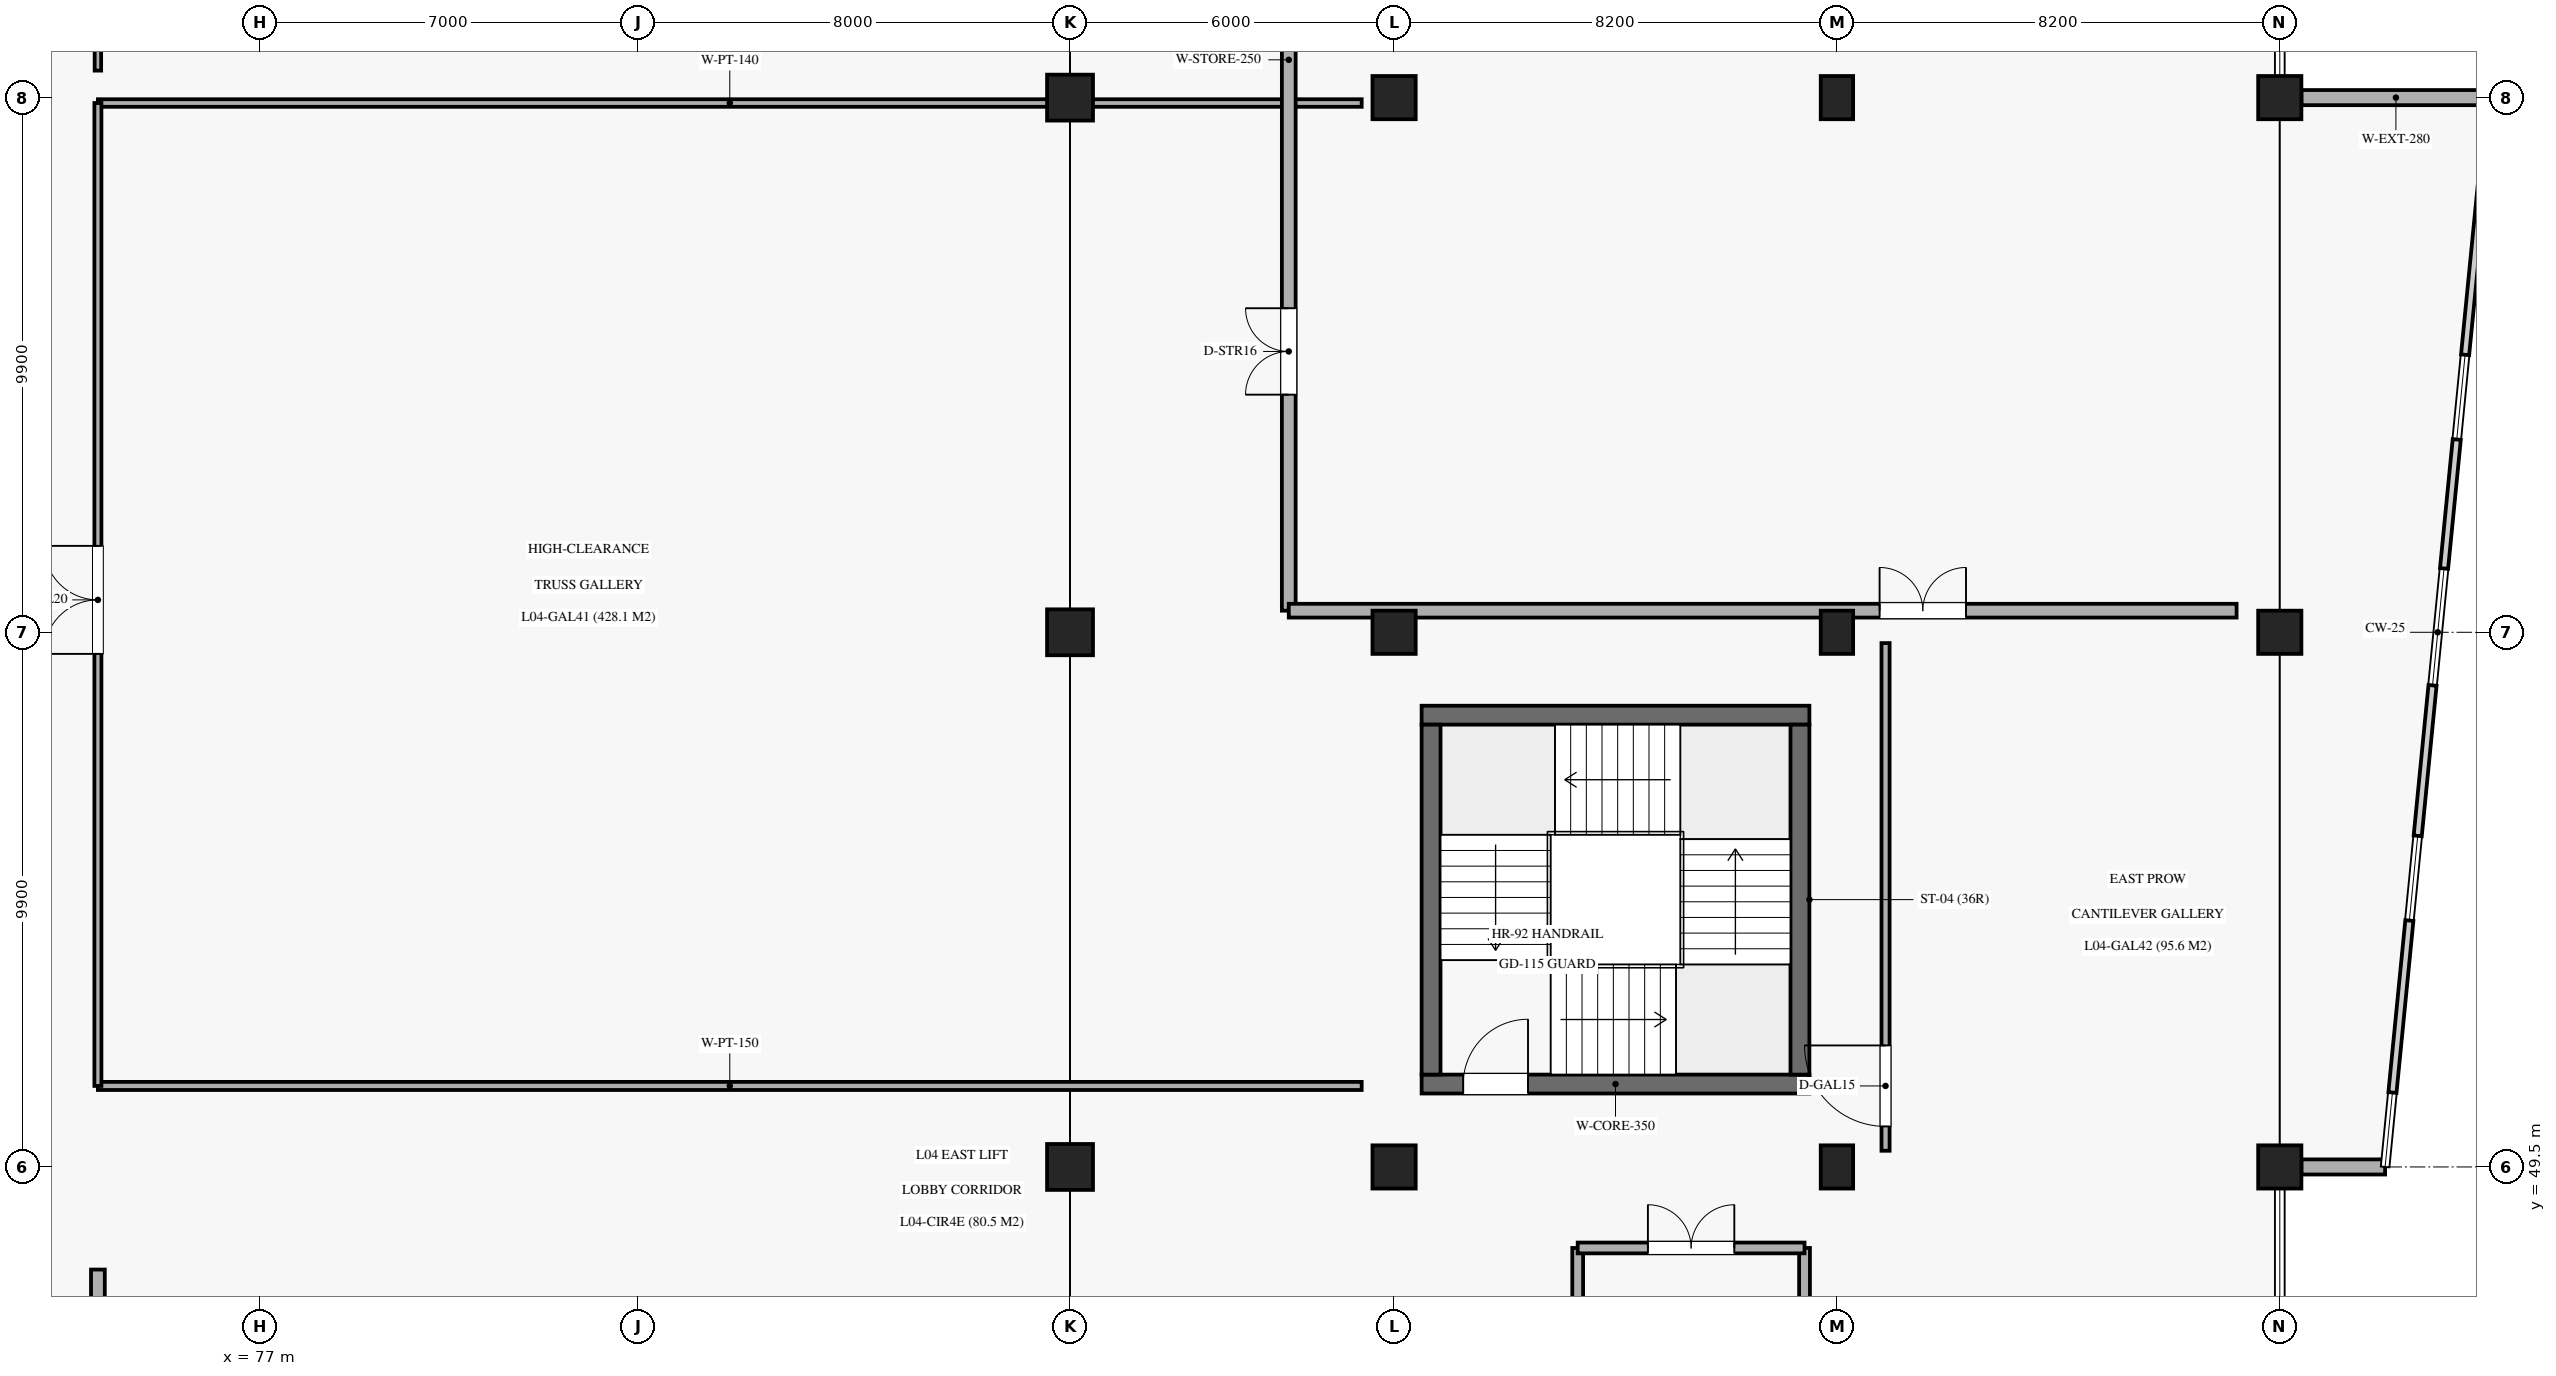
"""IFC4 building model, lengths in metres.
Left out: names, types, materials, properties, quantities, classifications, styles, units other than length and angle.
Written with IfcOpenShell. Run it as: python <this file> out.ifc"""

import sys

from ifc_helpers import new_model, si_unit, direction, frame, frame_2d, origin, origin_2d, place, context, subcontext, project, spatial, rectangle, extrude, element, fill, save


model = new_model("IFC4")
c1 = context("Model", 3, precision=1e-05, world=origin(), true_north=direction((0.0, 1.0)))
c2 = subcontext(c1, "Body", "Model", "MODEL_VIEW")
j1 = project(units=[si_unit("LENGTHUNIT", "METRE"), si_unit("PLANEANGLEUNIT", "RADIAN")], contexts=[c1])
p1 = place(None, origin())
s1 = spatial("IfcSite", under=j1, at=p1, CompositionType="ELEMENT")
p2 = place(p1, origin())
s2 = spatial("IfcBuilding", under=s1, at=p2, CompositionType="ELEMENT")
p3 = place(p2, frame((0.0, 0.0, 22.44)))
s3 = spatial("IfcBuildingStorey", under=s2, at=p3, CompositionType="ELEMENT", Elevation=22.44)
for number, where, z_axis, x_axis in (
    (1, (92.0, 49.5, 0.0), (0.0, 0.0, 1.0), (1.0, 0.0, 0.0)),
    (2, (92.0, 59.4, 0.0), (0.0, 0.0, 1.0), (1.0, 0.0, 0.0)),
    (3, (92.0, 69.3, 0.0), (0.0, 0.0, 1.0), (1.0, 0.0, 0.0)),
):
    element("IfcColumn", number, at=place(p3, frame(where, z_axis=z_axis, x_axis=x_axis)), inside=s3, PredefinedType="COLUMN", context=c2, shape_type="SweptSolid", body=[
        extrude(rectangle(XDim=0.85, YDim=0.85, at=origin_2d()), origin(), (0.0, 0.0, 1.0), 6.12),
    ])
for number, where, z_axis, x_axis in (
    (4, (98.0, 49.5, 0.0), (0.0, 0.0, 1.0), (1.0, 0.0, 0.0)),
    (5, (98.0, 59.4, 0.0), (0.0, 0.0, 1.0), (1.0, 0.0, 0.0)),
    (6, (98.0, 69.3, 0.0), (0.0, 0.0, 1.0), (1.0, 0.0, 0.0)),
):
    element("IfcColumn", number, at=place(p3, frame(where, z_axis=z_axis, x_axis=x_axis)), inside=s3, PredefinedType="COLUMN", context=c2, shape_type="SweptSolid", body=[
        extrude(rectangle(XDim=0.8, YDim=0.8, at=origin_2d()), origin(), (0.0, 0.0, 1.0), 6.12),
    ])
for number, where, z_axis, x_axis in (
    (7, (106.2, 49.5, 0.0), (0.0, 0.0, 1.0), (1.0, 0.0, 0.0)),
    (8, (106.2, 59.4, 0.0), (0.0, 0.0, 1.0), (1.0, 0.0, 0.0)),
    (9, (106.2, 69.3, 0.0), (0.0, 0.0, 1.0), (1.0, 0.0, 0.0)),
):
    element("IfcColumn", number, at=place(p3, frame(where, z_axis=z_axis, x_axis=x_axis)), inside=s3, PredefinedType="COLUMN", context=c2, shape_type="SweptSolid", body=[
        extrude(rectangle(XDim=0.6, YDim=0.8, at=origin_2d()), origin(), (0.0, 0.0, 1.0), 6.12),
    ])
for number, where, z_axis, x_axis in (
    (10, (114.4, 49.5, 0.0), (0.0, 0.0, 1.0), (1.0, 0.0, 0.0)),
    (11, (114.4, 59.4, 0.0), (0.0, 0.0, 1.0), (1.0, 0.0, 0.0)),
    (12, (114.4, 69.3, 0.0), (0.0, 0.0, 1.0), (1.0, 0.0, 0.0)),
):
    element("IfcColumn", number, at=place(p3, frame(where, z_axis=z_axis, x_axis=x_axis)), inside=s3, PredefinedType="COLUMN", context=c2, shape_type="SweptSolid", body=[
        extrude(rectangle(XDim=0.8, YDim=0.8, at=origin_2d()), origin(), (0.0, 0.0, 1.0), 6.12),
    ])
p4 = place(p3, frame((114.8, 49.5, 0.0), z_axis=(0.0, 0.0, 1.0), x_axis=(1.0, 0.0, 0.0)))
e13 = element("IfcWall", 13, at=p4, inside=s3, PredefinedType="SOLIDWALL", context=c2, shape_type="SweptSolid", body=[
    extrude(rectangle(XDim=1.55, YDim=0.28, at=frame_2d((0.775, 0.0))), origin(), (0.0, 0.0, 1.0), 5.06),
])
p5 = place(p3, frame((118.3, 69.3, 0.0), z_axis=(0.0, 0.0, 1.0), x_axis=(-1.0, 0.0, 0.0)))
e14 = element("IfcWall", 14, at=p5, inside=s3, PredefinedType="SOLIDWALL", context=c2, shape_type="SweptSolid", body=[
    extrude(rectangle(XDim=3.5, YDim=0.28, at=frame_2d((1.75, 0.0))), origin(), (0.0, 0.0, 1.0), 5.06),
])
p6 = place(p3, frame((98.51, 51.035, 0.0), z_axis=(0.0, 0.0, 1.0), x_axis=(1.0, 0.0, 0.0)))
e15 = element("IfcWall", 15, at=p6, inside=s3, PredefinedType="SHEAR", context=c2, shape_type="SweptSolid", body=[
    extrude(rectangle(XDim=7.18, YDim=0.35, at=frame_2d((3.59, 0.0))), origin(), (0.0, 0.0, 1.0), 5.84),
])
p7 = place(p6, frame((0.77, 0.0, 0.0)))
e16 = element("IfcOpeningElement", 16, at=p7, cuts=e15, PredefinedType="OPENING", context=c2, shape_type="SweptSolid", body=[
    extrude(rectangle(XDim=1.2, YDim=2.2, at=frame_2d((0.6, 1.1))), frame((0.0, 0.185, 0.0), z_axis=(0.0, -1.0, 0.0), x_axis=(1.0, 0.0, 0.0)), (0.0, 0.0, 1.0), 0.37),
])
p8 = place(p3, frame((98.51, 57.865, 0.0), z_axis=(0.0, 0.0, 1.0), x_axis=(1.0, 0.0, 0.0)))
e17 = element("IfcWall", 17, at=p8, inside=s3, PredefinedType="SHEAR", context=c2, shape_type="SweptSolid", body=[
    extrude(rectangle(XDim=7.18, YDim=0.35, at=frame_2d((3.59, 0.0))), origin(), (0.0, 0.0, 1.0), 5.84),
])
for number, where, z_axis, x_axis in (
    (18, (98.685, 51.21, 0.0), (0.0, 0.0, 1.0), (0.0, 1.0, 0.0)),
    (19, (105.515, 51.21, 0.0), (0.0, 0.0, 1.0), (0.0, 1.0, 0.0)),
):
    element("IfcWall", number, at=place(p3, frame(where, z_axis=z_axis, x_axis=x_axis)), inside=s3, PredefinedType="SHEAR", context=c2, shape_type="SweptSolid", body=[
        extrude(rectangle(XDim=6.48, YDim=0.35, at=frame_2d((3.24, 0.0))), origin(), (0.0, 0.0, 1.0), 5.84),
    ])
p9 = place(p3, frame((101.4, 45.6, 0.0), z_axis=(0.0, 0.0, 1.0), x_axis=(0.0, 1.0, 0.0)))
e20 = element("IfcWall", 20, at=p9, inside=s3, PredefinedType="SOLIDWALL", context=c2, shape_type="SweptSolid", body=[
    extrude(rectangle(XDim=2.4, YDim=0.2, at=frame_2d((1.2, 0.0))), origin(), (0.0, 0.0, 1.0), 4.96),
])
p10 = place(p3, frame((105.6, 40.3, 0.0), z_axis=(0.0, 0.0, 1.0), x_axis=(0.0, 1.0, 0.0)))
e21 = element("IfcWall", 21, at=p10, inside=s3, PredefinedType="SOLIDWALL", context=c2, shape_type="SweptSolid", body=[
    extrude(rectangle(XDim=7.7, YDim=0.2, at=frame_2d((3.85, 0.0))), origin(), (0.0, 0.0, 1.0), 4.96),
])
p11 = place(p3, frame((101.4, 48.0, 0.0), z_axis=(0.0, 0.0, 1.0), x_axis=(1.0, 0.0, 0.0)))
e22 = element("IfcWall", 22, at=p11, inside=s3, PredefinedType="SOLIDWALL", context=c2, shape_type="SweptSolid", body=[
    extrude(rectangle(XDim=4.2, YDim=0.2, at=frame_2d((2.1, 0.0))), origin(), (0.0, 0.0, 1.0), 4.96),
])
p12 = place(p11, frame((1.3, 0.0, 0.0)))
e23 = element("IfcOpeningElement", 23, at=p12, cuts=e22, PredefinedType="OPENING", context=c2, shape_type="SweptSolid", body=[
    extrude(rectangle(XDim=1.6, YDim=2.2, at=frame_2d((0.8, 1.1))), frame((0.0, 0.11, 0.0), z_axis=(0.0, -1.0, 0.0), x_axis=(1.0, 0.0, 0.0)), (0.0, 0.0, 1.0), 0.22),
])
p13 = place(p3, frame((74.0, 51.0, 0.0), z_axis=(0.0, 0.0, 1.0), x_axis=(1.0, 0.0, 0.0)))
e24 = element("IfcWall", 24, at=p13, inside=s3, PredefinedType="PARTITIONING", context=c2, shape_type="SweptSolid", body=[
    extrude(rectangle(XDim=23.4, YDim=0.15, at=frame_2d((11.7, 0.0))), origin(), (0.0, 0.0, 1.0), 4.96),
])
p14 = place(p3, frame((74.0, 69.2, 0.0), z_axis=(0.0, 0.0, 1.0), x_axis=(1.0, 0.0, 0.0)))
e25 = element("IfcWall", 25, at=p14, inside=s3, PredefinedType="PARTITIONING", context=c2, shape_type="SweptSolid", body=[
    extrude(rectangle(XDim=23.4, YDim=0.14, at=frame_2d((11.7, 0.0))), origin(), (0.0, 0.0, 1.0), 4.96),
])
p15 = place(p3, frame((74.0, 51.0, 0.0), z_axis=(0.0, 0.0, 1.0), x_axis=(0.0, 1.0, 0.0)))
e26 = element("IfcWall", 26, at=p15, inside=s3, PredefinedType="PARTITIONING", context=c2, shape_type="SweptSolid", body=[
    extrude(rectangle(XDim=18.2, YDim=0.13, at=frame_2d((9.1, 0.0))), origin(), (0.0, 0.0, 1.0), 4.96),
])
p16 = place(p15, frame((8.0, 0.0, 0.0)))
e27 = element("IfcOpeningElement", 27, at=p16, cuts=e26, PredefinedType="OPENING", context=c2, shape_type="SweptSolid", body=[
    extrude(rectangle(XDim=2.0, YDim=2.5, at=frame_2d((1.0, 1.25))), frame((0.0, 0.075, 0.0), z_axis=(0.0, -1.0, 0.0), x_axis=(1.0, 0.0, 0.0)), (0.0, 0.0, 1.0), 0.15),
])
p17 = place(p3, frame((74.0, 69.8, 0.0), z_axis=(0.0, 0.0, 1.0), x_axis=(0.0, 1.0, 0.0)))
e28 = element("IfcWall", 28, at=p17, inside=s3, PredefinedType="PARTITIONING", context=c2, shape_type="SweptSolid", body=[
    extrude(rectangle(XDim=18.8, YDim=0.12, at=frame_2d((9.4, 0.0))), origin(), (0.0, 0.0, 1.0), 4.96),
])
p18 = place(p17, frame((7.5, 0.0, 0.0)))
e29 = element("IfcOpeningElement", 29, at=p18, cuts=e28, PredefinedType="OPENING", context=c2, shape_type="SweptSolid", body=[
    extrude(rectangle(XDim=1.8, YDim=2.3, at=frame_2d((0.9, 1.15))), frame((0.0, 0.07, 0.0), z_axis=(0.0, -1.0, 0.0), x_axis=(1.0, 0.0, 0.0)), (0.0, 0.0, 1.0), 0.14),
])
p19 = place(p3, frame((96.05, 59.8, 0.0), z_axis=(0.0, 0.0, 1.0), x_axis=(0.0, 1.0, 0.0)))
e30 = element("IfcWall", 30, at=p19, inside=s3, PredefinedType="SOLIDWALL", context=c2, shape_type="SweptSolid", body=[
    extrude(rectangle(XDim=28.8, YDim=0.255, at=frame_2d((14.4, 0.0))), origin(), (0.0, 0.0, 1.0), 4.96),
])
p20 = place(p19, frame((4.0, 0.0, 0.0)))
e31 = element("IfcOpeningElement", 31, at=p20, cuts=e30, PredefinedType="OPENING", context=c2, shape_type="SweptSolid", body=[
    extrude(rectangle(XDim=1.6, YDim=2.3, at=frame_2d((0.8, 1.15))), frame((0.0, 0.137, 0.0), z_axis=(0.0, -1.0, 0.0), x_axis=(1.0, 0.0, 0.0)), (0.0, 0.0, 1.0), 0.275),
])
p21 = place(p3, frame((96.05, 59.8, 0.0), z_axis=(0.0, 0.0, 1.0), x_axis=(1.0, 0.0, 0.0)))
e32 = element("IfcWall", 32, at=p21, inside=s3, PredefinedType="SOLIDWALL", context=c2, shape_type="SweptSolid", body=[
    extrude(rectangle(XDim=17.55, YDim=0.255, at=frame_2d((8.775, 0.0))), origin(), (0.0, 0.0, 1.0), 4.96),
])
p22 = place(p21, frame((10.94, 0.0, 0.0)))
e33 = element("IfcOpeningElement", 33, at=p22, cuts=e32, PredefinedType="OPENING", context=c2, shape_type="SweptSolid", body=[
    extrude(rectangle(XDim=1.6, YDim=2.3, at=frame_2d((0.8, 1.15))), frame((0.0, 0.137, 0.0), z_axis=(0.0, -1.0, 0.0), x_axis=(1.0, 0.0, 0.0)), (0.0, 0.0, 1.0), 0.275),
])
p23 = place(p3, frame((74.0, 30.2, 0.0), z_axis=(0.0, 0.0, 1.0), x_axis=(0.0, 1.0, 0.0)))
e34 = element("IfcWall", 34, at=p23, inside=s3, PredefinedType="SOLIDWALL", context=c2, shape_type="SweptSolid", body=[
    extrude(rectangle(XDim=17.4, YDim=0.255, at=frame_2d((8.7, 0.0))), origin(), (0.0, 0.0, 1.0), 4.96),
])
p24 = place(p23, frame((6.5, 0.0, 0.0)))
e35 = element("IfcOpeningElement", 35, at=p24, cuts=e34, PredefinedType="OPENING", context=c2, shape_type="SweptSolid", body=[
    extrude(rectangle(XDim=1.8, YDim=2.35, at=frame_2d((0.9, 1.175))), frame((0.0, 0.137, 0.0), z_axis=(0.0, -1.0, 0.0), x_axis=(1.0, 0.0, 0.0)), (0.0, 0.0, 1.0), 0.275),
])
p25 = place(p3, frame((107.1, 49.8, 0.0), z_axis=(0.0, 0.0, 1.0), x_axis=(0.0, 1.0, 0.0)))
e36 = element("IfcWall", 36, at=p25, inside=s3, PredefinedType="PARTITIONING", context=c2, shape_type="SweptSolid", body=[
    extrude(rectangle(XDim=9.4, YDim=0.15, at=frame_2d((4.7, 0.0))), origin(), (0.0, 0.0, 1.0), 4.96),
])
p26 = place(p25, frame((0.45, 0.0, 0.0)))
e37 = element("IfcOpeningElement", 37, at=p26, cuts=e36, PredefinedType="OPENING", context=c2, shape_type="SweptSolid", body=[
    extrude(rectangle(XDim=1.5, YDim=2.4, at=frame_2d((0.75, 1.2))), frame((0.0, 0.085, 0.0), z_axis=(0.0, -1.0, 0.0), x_axis=(1.0, 0.0, 0.0)), (0.0, 0.0, 1.0), 0.17),
])
p27 = place(p7, origin())
e38 = element("IfcDoor", 38, at=p27, inside=s3, OperationType="SINGLE_SWING_RIGHT", PredefinedType="DOOR", context=c2, shape_type="SweptSolid", body=[
    extrude(rectangle(XDim=1.2, YDim=2.2, at=frame_2d((0.6, 1.1))), frame((0.0, 0.025, 0.0), z_axis=(0.0, -1.0, 0.0), x_axis=(1.0, 0.0, 0.0)), (0.0, 0.0, 1.0), 0.05),
])
fill(e16, e38)
p28 = place(p12, origin())
e39 = element("IfcDoor", 39, at=p28, inside=s3, OperationType="DOUBLE_DOOR_SINGLE_SWING", PredefinedType="DOOR", context=c2, shape_type="SweptSolid", body=[
    extrude(rectangle(XDim=1.6, YDim=2.2, at=frame_2d((0.8, 1.1))), frame((0.0, 0.025, 0.0), z_axis=(0.0, -1.0, 0.0), x_axis=(1.0, 0.0, 0.0)), (0.0, 0.0, 1.0), 0.05),
])
fill(e23, e39)
p29 = place(p16, origin())
e40 = element("IfcDoor", 40, at=p29, inside=s3, OperationType="DOUBLE_DOOR_SINGLE_SWING", PredefinedType="DOOR", context=c2, shape_type="SweptSolid", body=[
    extrude(rectangle(XDim=2.0, YDim=2.5, at=frame_2d((1.0, 1.25))), frame((0.0, 0.025, 0.0), z_axis=(0.0, -1.0, 0.0), x_axis=(1.0, 0.0, 0.0)), (0.0, 0.0, 1.0), 0.05),
])
fill(e27, e40)
p30 = place(p20, origin())
e41 = element("IfcDoor", 41, at=p30, inside=s3, OperationType="DOUBLE_DOOR_SINGLE_SWING", PredefinedType="DOOR", context=c2, shape_type="SweptSolid", body=[
    extrude(rectangle(XDim=1.6, YDim=2.3, at=frame_2d((0.8, 1.15))), frame((0.0, 0.025, 0.0), z_axis=(0.0, -1.0, 0.0), x_axis=(1.0, 0.0, 0.0)), (0.0, 0.0, 1.0), 0.05),
])
fill(e31, e41)
p31 = place(p22, origin())
e42 = element("IfcDoor", 42, at=p31, inside=s3, OperationType="DOUBLE_DOOR_SINGLE_SWING", PredefinedType="DOOR", context=c2, shape_type="SweptSolid", body=[
    extrude(rectangle(XDim=1.6, YDim=2.3, at=frame_2d((0.8, 1.15))), frame((0.0, 0.025, 0.0), z_axis=(0.0, -1.0, 0.0), x_axis=(1.0, 0.0, 0.0)), (0.0, 0.0, 1.0), 0.05),
])
fill(e33, e42)
p32 = place(p26, origin())
e43 = element("IfcDoor", 43, at=p32, inside=s3, OperationType="SINGLE_SWING_RIGHT", PredefinedType="DOOR", context=c2, shape_type="SweptSolid", body=[
    extrude(rectangle(XDim=1.5, YDim=2.4, at=frame_2d((0.75, 1.2))), frame((0.0, 0.025, 0.0), z_axis=(0.0, -1.0, 0.0), x_axis=(1.0, 0.0, 0.0)), (0.0, 0.0, 1.0), 0.05),
])
fill(e37, e43)
save(model, sys.argv[1])
